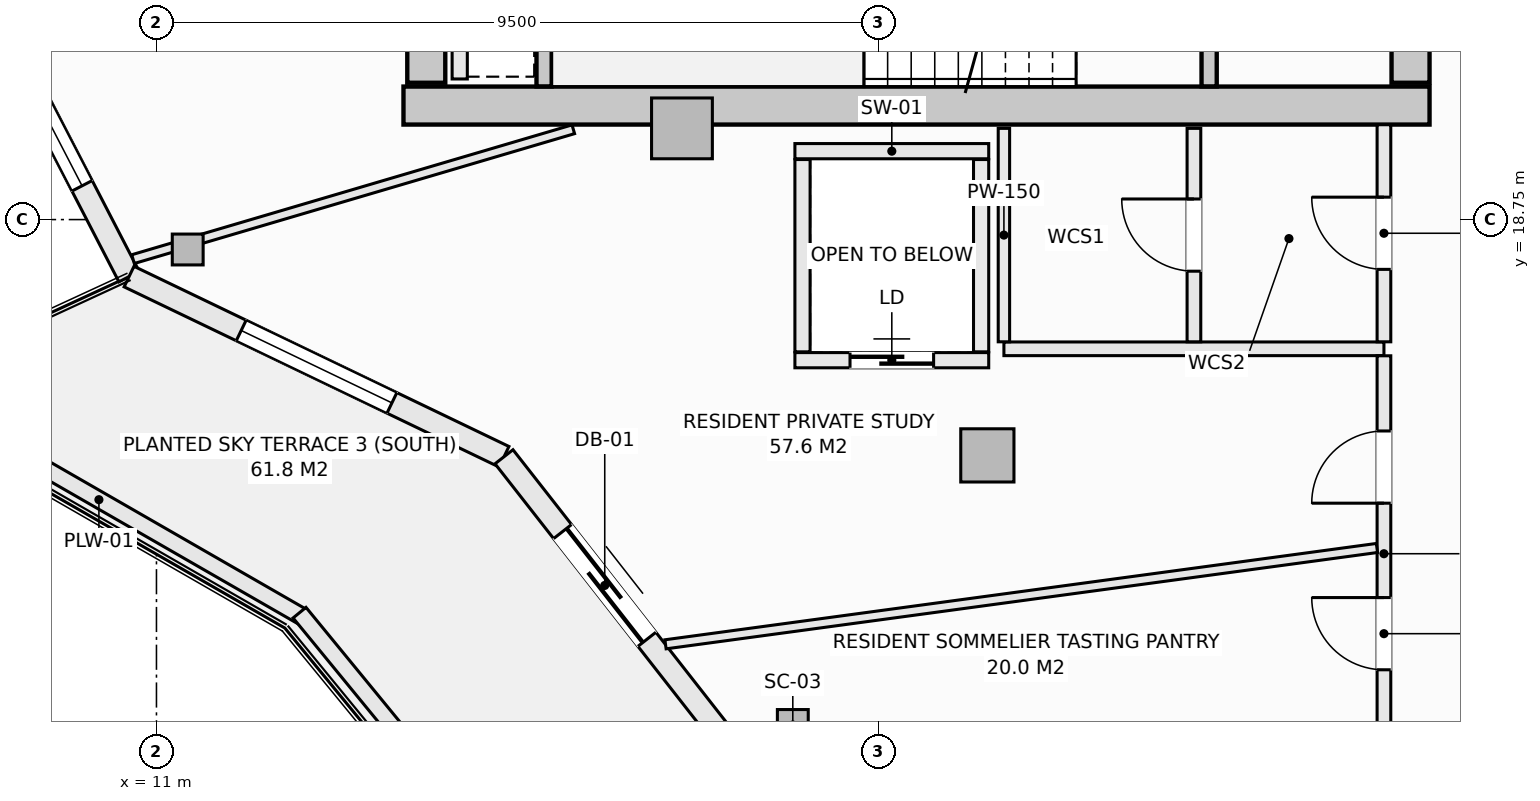
"""IFC4 building model, lengths in metres.
Left out: names, types, materials, properties, quantities, classifications, styles, units other than length and angle.
Written with IfcOpenShell. Run it as: python <this file> out.ifc"""

import sys

from ifc_helpers import new_model, si_unit, direction, frame, frame_2d, origin, origin_2d, place, context, subcontext, project, spatial, rectangle, hollow_rectangle, extrude, element, fill, save


model = new_model("IFC4")
c1 = context("Model", 3, precision=1e-05, world=origin(), true_north=direction((0.0, 1.0)))
c2 = subcontext(c1, "Body", "Model", "MODEL_VIEW")
j1 = project(units=[si_unit("LENGTHUNIT", "METRE"), si_unit("PLANEANGLEUNIT", "RADIAN")], contexts=[c1])
p1 = place(None, origin())
s1 = spatial("IfcSite", under=j1, at=p1, CompositionType="ELEMENT")
p2 = place(p1, origin())
s2 = spatial("IfcBuilding", under=s1, at=p2, CompositionType="ELEMENT")
p3 = place(p2, frame((0.0, 0.0, 245.9)))
s3 = spatial("IfcBuildingStorey", under=s2, at=p3, CompositionType="ELEMENT", Elevation=245.9)
p4 = place(p3, frame((14.25, 20.25, -0.27), z_axis=(0.0, 0.0, 1.0), x_axis=(1.0, 0.0, 0.0)))
e1 = element("IfcWall", 1, at=p4, inside=s3, PredefinedType="SHEAR", context=c2, shape_type="SweptSolid", body=[
    extrude(rectangle(XDim=13.5, YDim=0.5, at=frame_2d((6.75, 0.0))), origin(), (0.0, 0.0, 1.0), 3.3),
])
p5 = place(p3, frame((14.55, 20.55, -0.27), z_axis=(0.0, 0.0, 1.0), x_axis=(0.0, 1.0, 0.0)))
e2 = element("IfcWall", 2, at=p5, inside=s3, PredefinedType="SHEAR", context=c2, shape_type="SweptSolid", body=[
    extrude(rectangle(XDim=12.9, YDim=0.5, at=frame_2d((6.45, 0.0))), origin(), (0.0, 0.0, 1.0), 3.3),
])
p6 = place(p3, frame((27.5, 20.55, -0.27), z_axis=(0.0, 0.0, 1.0), x_axis=(0.0, 1.0, 0.0)))
e3 = element("IfcWall", 3, at=p6, inside=s3, PredefinedType="SHEAR", context=c2, shape_type="SweptSolid", body=[
    extrude(rectangle(XDim=1.5, YDim=0.5, at=frame_2d((0.75, 0.0))), origin(), (0.0, 0.0, 1.0), 3.3),
])
for number, where, z_axis, x_axis in (
    (4, (11.411, 18.356, -0.27), (0.0, 0.0, 1.0), (1.0, 0.0, 0.0)),
    (5, (19.372, 12.101, -0.27), (0.0, 0.0, 1.0), (1.0, 0.0, 0.0)),
):
    element("IfcColumn", number, at=place(p3, frame(where, z_axis=z_axis, x_axis=x_axis)), inside=s3, PredefinedType="COLUMN", context=c2, shape_type="SweptSolid", body=[
        extrude(hollow_rectangle(XDim=0.406, YDim=0.406, WallThickness=0.016, at=origin_2d()), origin(), (0.0, 0.0, 1.0), 3.3),
    ])
p7 = place(p3, frame((21.932, 15.648, -0.27), z_axis=(0.0, 0.0, 1.0), x_axis=(1.0, 0.0, 0.0)))
e6 = element("IfcColumn", 6, at=p7, inside=s3, PredefinedType="COLUMN", context=c2, shape_type="SweptSolid", body=[
    extrude(rectangle(XDim=0.7, YDim=0.7, at=origin_2d()), origin(), (0.0, 0.0, 1.0), 3.3),
])
p8 = place(p3, frame((17.914, 19.95, -0.27), z_axis=(0.0, 0.0, 1.0), x_axis=(1.0, 0.0, 0.0)))
e7 = element("IfcColumn", 7, at=p8, inside=s3, PredefinedType="PILASTER", context=c2, shape_type="SweptSolid", body=[
    extrude(rectangle(XDim=0.8, YDim=0.8, at=origin_2d()), origin(), (0.0, 0.0, 1.0), 3.3),
])
p9 = place(p3, frame((8.392, 22.341, 0.0), z_axis=(0.0, 0.0, 1.0), x_axis=(0.459793771602, -0.888025724625, 0.0)))
e8 = element("IfcWall", 8, at=p9, inside=s3, PredefinedType="SOLIDWALL", context=c2, shape_type="SweptSolid", body=[
    extrude(rectangle(XDim=4.889, YDim=0.3, at=frame_2d((2.444, 0.0))), origin(), (0.0, 0.0, 1.0), 2.605),
])
p10 = place(p9, frame((1.344, 0.0, 0.72)))
e9 = element("IfcOpeningElement", 9, at=p10, cuts=e8, PredefinedType="OPENING", context=c2, shape_type="SweptSolid", body=[
    extrude(rectangle(XDim=2.2, YDim=1.65, at=frame_2d((1.1, 0.825))), frame((0.0, 0.16, 0.0), z_axis=(0.0, -1.0, 0.0), x_axis=(1.0, 0.0, 0.0)), (0.0, 0.0, 1.0), 0.32),
])
p11 = place(p3, frame((10.639, 18.0, 0.0), z_axis=(0.0, 0.0, 1.0), x_axis=(0.901355238351, -0.433080517106, 0.0)))
e10 = element("IfcWall", 10, at=p11, inside=s3, PredefinedType="SOLIDWALL", context=c2, shape_type="SweptSolid", body=[
    extrude(rectangle(XDim=5.473, YDim=0.3, at=frame_2d((2.737, 0.0))), origin(), (0.0, 0.0, 1.0), 2.605),
])
p12 = place(p11, frame((1.637, 0.0, 0.72)))
e11 = element("IfcOpeningElement", 11, at=p12, cuts=e10, PredefinedType="OPENING", context=c2, shape_type="SweptSolid", body=[
    extrude(rectangle(XDim=2.2, YDim=1.65, at=frame_2d((1.1, 0.825))), frame((0.0, 0.16, 0.0), z_axis=(0.0, -1.0, 0.0), x_axis=(1.0, 0.0, 0.0)), (0.0, 0.0, 1.0), 0.32),
])
p13 = place(p3, frame((15.573, 15.63, 0.0), z_axis=(0.0, 0.0, 1.0), x_axis=(0.61644588519, -0.787397276241, 0.0)))
e12 = element("IfcWall", 12, at=p13, inside=s3, PredefinedType="SOLIDWALL", context=c2, shape_type="SweptSolid", body=[
    extrude(rectangle(XDim=5.357, YDim=0.3, at=frame_2d((2.678, 0.0))), origin(), (0.0, 0.0, 1.0), 2.605),
])
p14 = place(p13, frame((1.25, 0.0, 0.0)))
e13 = element("IfcOpeningElement", 13, at=p14, cuts=e12, PredefinedType="OPENING", context=c2, shape_type="SweptSolid", body=[
    extrude(rectangle(XDim=1.8, YDim=2.25, at=frame_2d((0.9, 1.125))), frame((0.0, 0.16, 0.0), z_axis=(0.0, -1.0, 0.0), x_axis=(1.0, 0.0, 0.0)), (0.0, 0.0, 1.0), 0.32),
])
p15 = place(p3, frame((7.557, 16.609, 0.0), z_axis=(0.0, 0.0, 1.0), x_axis=(0.866901621005, -0.49847926687, 0.0)))
e14 = element("IfcWall", 14, at=p15, inside=s3, PredefinedType="PARAPET", context=c2, shape_type="SweptSolid", body=[
    extrude(rectangle(XDim=6.197, YDim=0.22, at=frame_2d((3.098, 0.0))), origin(), (0.0, 0.0, 1.0), 0.52),
])
p16 = place(p3, frame((12.882, 13.579, 0.0), z_axis=(0.0, 0.0, 1.0), x_axis=(0.63407318032, -0.77327304492, 0.0)))
e15 = element("IfcWall", 15, at=p16, inside=s3, PredefinedType="PARAPET", context=c2, shape_type="SweptSolid", body=[
    extrude(rectangle(XDim=6.379, YDim=0.22, at=frame_2d((3.189, 0.0))), origin(), (0.0, 0.0, 1.0), 0.52),
])
p17 = place(p3, frame((24.85, 20.502, -0.27), z_axis=(0.0, 0.0, 1.0), x_axis=(0.0, 1.0, 0.0)))
e16 = element("IfcWall", 16, at=p17, inside=s3, PredefinedType="SHEAR", context=c2, shape_type="SweptSolid", body=[
    extrude(rectangle(XDim=3.038, YDim=0.2, at=frame_2d((1.519, 0.0))), origin(), (0.0, 0.0, 1.0), 3.3),
])
p18 = place(p17, frame((0.969, 0.0, 0.27)))
e17 = element("IfcOpeningElement", 17, at=p18, cuts=e16, PredefinedType="OPENING", context=c2, shape_type="SweptSolid", body=[
    extrude(rectangle(XDim=1.1, YDim=2.15, at=frame_2d((0.55, 1.075))), frame((0.0, 0.11, 0.0), z_axis=(0.0, -1.0, 0.0), x_axis=(1.0, 0.0, 0.0)), (0.0, 0.0, 1.0), 0.22),
])
p19 = place(p3, frame((16.1, 20.502, -0.27), z_axis=(0.0, 0.0, 1.0), x_axis=(0.0, 1.0, 0.0)))
e18 = element("IfcWall", 18, at=p19, inside=s3, PredefinedType="SHEAR", context=c2, shape_type="SweptSolid", body=[
    extrude(rectangle(XDim=3.036, YDim=0.2, at=frame_2d((1.518, 0.0))), origin(), (0.0, 0.0, 1.0), 3.3),
])
p20 = place(p3, frame((19.4, 19.65, 0.0), z_axis=(0.0, 0.0, 1.0), x_axis=(1.0, 0.0, 0.0)))
e19 = element("IfcWall", 19, at=p20, inside=s3, PredefinedType="SOLIDWALL", context=c2, shape_type="SweptSolid", body=[
    extrude(rectangle(XDim=2.55, YDim=0.2, at=frame_2d((1.275, 0.0))), origin(), (0.0, 0.0, 1.0), 3.03),
])
p21 = place(p3, frame((19.4, 16.9, 0.0), z_axis=(0.0, 0.0, 1.0), x_axis=(1.0, 0.0, 0.0)))
e20 = element("IfcWall", 20, at=p21, inside=s3, PredefinedType="SOLIDWALL", context=c2, shape_type="SweptSolid", body=[
    extrude(rectangle(XDim=2.55, YDim=0.2, at=frame_2d((1.275, 0.0))), origin(), (0.0, 0.0, 1.0), 3.03),
])
p22 = place(p21, frame((0.725, 0.0, 0.0)))
e21 = element("IfcOpeningElement", 21, at=p22, cuts=e20, PredefinedType="OPENING", context=c2, shape_type="SweptSolid", body=[
    extrude(rectangle(XDim=1.1, YDim=2.2, at=frame_2d((0.55, 1.1))), frame((0.0, 0.11, 0.0), z_axis=(0.0, -1.0, 0.0), x_axis=(1.0, 0.0, 0.0)), (0.0, 0.0, 1.0), 0.22),
])
for number, where, z_axis, x_axis in (
    (22, (19.5, 17.01, 0.0), (0.0, 0.0, 1.0), (0.0, 1.0, 0.0)),
    (23, (21.85, 17.01, 0.0), (0.0, 0.0, 1.0), (0.0, 1.0, 0.0)),
):
    element("IfcWall", number, at=place(p3, frame(where, z_axis=z_axis, x_axis=x_axis)), inside=s3, PredefinedType="SOLIDWALL", context=c2, shape_type="SweptSolid", body=[
        extrude(rectangle(XDim=2.53, YDim=0.2, at=frame_2d((1.265, 0.0))), origin(), (0.0, 0.0, 1.0), 3.03),
    ])
p23 = place(p3, frame((14.99, 20.6, 0.0), z_axis=(0.0, 0.0, 1.0), x_axis=(0.0, 1.0, 0.0)))
e24 = element("IfcWall", 24, at=p23, inside=s3, PredefinedType="SOLIDWALL", context=c2, shape_type="SweptSolid", body=[
    extrude(rectangle(XDim=2.85, YDim=0.2, at=frame_2d((1.425, 0.0))), origin(), (0.0, 0.0, 1.0), 3.03),
])
p24 = place(p3, frame((22.15, 17.05, 0.0), z_axis=(0.0, 0.0, 1.0), x_axis=(1.0, 0.0, 0.0)))
e25 = element("IfcWall", 25, at=p24, inside=s3, PredefinedType="SOLIDWALL", context=c2, shape_type="SweptSolid", body=[
    extrude(rectangle(XDim=5.0, YDim=0.18, at=frame_2d((2.5, 0.0))), origin(), (0.0, 0.0, 1.0), 3.03),
])
p25 = place(p3, frame((22.15, 17.142, 0.0), z_axis=(0.0, 0.0, 1.0), x_axis=(0.0, 1.0, 0.0)))
e26 = element("IfcWall", 26, at=p25, inside=s3, PredefinedType="PARTITIONING", context=c2, shape_type="SweptSolid", body=[
    extrude(rectangle(XDim=2.808, YDim=0.15, at=frame_2d((1.404, 0.0))), origin(), (0.0, 0.0, 1.0), 3.03),
])
p26 = place(p3, frame((24.65, 17.142, 0.0), z_axis=(0.0, 0.0, 1.0), x_axis=(0.0, 1.0, 0.0)))
e27 = element("IfcWall", 27, at=p26, inside=s3, PredefinedType="SOLIDWALL", context=c2, shape_type="SweptSolid", body=[
    extrude(rectangle(XDim=2.808, YDim=0.18, at=frame_2d((1.404, 0.0))), origin(), (0.0, 0.0, 1.0), 3.03),
])
p27 = place(p26, frame((0.929, 0.0, 0.0)))
e28 = element("IfcOpeningElement", 28, at=p27, cuts=e27, PredefinedType="OPENING", context=c2, shape_type="SweptSolid", body=[
    extrude(rectangle(XDim=0.95, YDim=2.1, at=frame_2d((0.475, 1.05))), frame((0.0, 0.1, 0.0), z_axis=(0.0, -1.0, 0.0), x_axis=(1.0, 0.0, 0.0)), (0.0, 0.0, 1.0), 0.2),
])
p28 = place(p3, frame((27.15, 11.75, 0.0), z_axis=(0.0, 0.0, 1.0), x_axis=(0.0, 1.0, 0.0)))
e29 = element("IfcWall", 29, at=p28, inside=s3, PredefinedType="SOLIDWALL", context=c2, shape_type="SweptSolid", body=[
    extrude(rectangle(XDim=5.208, YDim=0.18, at=frame_2d((2.604, 0.0))), origin(), (0.0, 0.0, 1.0), 3.03),
])
p29 = place(p28, frame((3.269, 0.0, 0.0)))
e30 = element("IfcOpeningElement", 30, at=p29, cuts=e29, PredefinedType="OPENING", context=c2, shape_type="SweptSolid", body=[
    extrude(rectangle(XDim=0.95, YDim=2.1, at=frame_2d((0.475, 1.05))), frame((0.0, 0.1, 0.0), z_axis=(0.0, -1.0, 0.0), x_axis=(1.0, 0.0, 0.0)), (0.0, 0.0, 1.0), 0.2),
])
p30 = place(p28, frame((1.077, 0.0, 0.0)))
e31 = element("IfcOpeningElement", 31, at=p30, cuts=e29, PredefinedType="OPENING", context=c2, shape_type="SweptSolid", body=[
    extrude(rectangle(XDim=0.95, YDim=2.1, at=frame_2d((0.475, 1.05))), frame((0.0, 0.1, 0.0), z_axis=(0.0, -1.0, 0.0), x_axis=(1.0, 0.0, 0.0)), (0.0, 0.0, 1.0), 0.2),
])
p31 = place(p3, frame((27.15, 17.142, 0.0), z_axis=(0.0, 0.0, 1.0), x_axis=(0.0, 1.0, 0.0)))
e32 = element("IfcWall", 32, at=p31, inside=s3, PredefinedType="SOLIDWALL", context=c2, shape_type="SweptSolid", body=[
    extrude(rectangle(XDim=2.856, YDim=0.18, at=frame_2d((1.428, 0.0))), origin(), (0.0, 0.0, 1.0), 3.03),
])
p32 = place(p31, frame((0.953, 0.0, 0.0)))
e33 = element("IfcOpeningElement", 33, at=p32, cuts=e32, PredefinedType="OPENING", context=c2, shape_type="SweptSolid", body=[
    extrude(rectangle(XDim=0.95, YDim=2.1, at=frame_2d((0.475, 1.05))), frame((0.0, 0.1, 0.0), z_axis=(0.0, -1.0, 0.0), x_axis=(1.0, 0.0, 0.0)), (0.0, 0.0, 1.0), 0.2),
])
p33 = place(p3, frame((10.692, 18.23, 0.0), z_axis=(0.0, 0.0, 1.0), x_axis=(0.959163130609, 0.282853475992, 0.0)))
e34 = element("IfcWall", 34, at=p33, inside=s3, PredefinedType="PARTITIONING", context=c2, shape_type="SweptSolid", body=[
    extrude(rectangle(XDim=6.039, YDim=0.12, at=frame_2d((3.02, 0.0))), origin(), (0.0, 0.0, 1.0), 2.77),
])
p34 = place(p3, frame((17.698, 13.162, 0.0), z_axis=(0.0, 0.0, 1.0), x_axis=(0.990958840374, 0.134166227808, 0.0)))
e35 = element("IfcWall", 35, at=p34, inside=s3, PredefinedType="PARTITIONING", context=c2, shape_type="SweptSolid", body=[
    extrude(rectangle(XDim=9.446, YDim=0.12, at=frame_2d((4.723, 0.0))), origin(), (0.0, 0.0, 1.0), 3.03),
])
p35 = place(p10, origin())
e36 = element("IfcWindow", 36, at=p35, inside=s3, PartitioningType="SINGLE_PANEL", PredefinedType="WINDOW", context=c2, shape_type="SweptSolid", body=[
    extrude(rectangle(XDim=2.2, YDim=1.65, at=frame_2d((1.1, 0.825))), frame((0.0, 0.03, 0.0), z_axis=(0.0, -1.0, 0.0), x_axis=(1.0, 0.0, 0.0)), (0.0, 0.0, 1.0), 0.06),
])
fill(e9, e36)
p36 = place(p12, origin())
e37 = element("IfcWindow", 37, at=p36, inside=s3, PartitioningType="SINGLE_PANEL", PredefinedType="WINDOW", context=c2, shape_type="SweptSolid", body=[
    extrude(rectangle(XDim=2.2, YDim=1.65, at=frame_2d((1.1, 0.825))), frame((0.0, 0.03, 0.0), z_axis=(0.0, -1.0, 0.0), x_axis=(1.0, 0.0, 0.0)), (0.0, 0.0, 1.0), 0.06),
])
fill(e11, e37)
p37 = place(p14, frame((1.8, 0.0, 0.0), z_axis=(0.0, 0.0, 1.0), x_axis=(-1.0, 0.0, 0.0)))
e38 = element("IfcDoor", 38, at=p37, inside=s3, OperationType="SLIDING_TO_LEFT", PredefinedType="DOOR", context=c2, shape_type="SweptSolid", body=[
    extrude(rectangle(XDim=1.8, YDim=2.25, at=frame_2d((0.9, 1.125))), frame((0.0, 0.025, 0.0), z_axis=(0.0, -1.0, 0.0), x_axis=(1.0, 0.0, 0.0)), (0.0, 0.0, 1.0), 0.05),
])
fill(e13, e38)
p38 = place(p22, origin())
e39 = element("IfcDoor", 39, at=p38, inside=s3, OperationType="SLIDING_TO_LEFT", PredefinedType="DOOR", context=c2, shape_type="SweptSolid", body=[
    extrude(rectangle(XDim=1.1, YDim=2.2, at=frame_2d((0.55, 1.1))), frame((0.0, 0.025, 0.0), z_axis=(0.0, -1.0, 0.0), x_axis=(1.0, 0.0, 0.0)), (0.0, 0.0, 1.0), 0.05),
])
fill(e21, e39)
p39 = place(p32, origin())
e40 = element("IfcDoor", 40, at=p39, inside=s3, OperationType="SINGLE_SWING_RIGHT", PredefinedType="DOOR", context=c2, shape_type="SweptSolid", body=[
    extrude(rectangle(XDim=0.95, YDim=2.1, at=frame_2d((0.475, 1.05))), frame((0.0, 0.025, 0.0), z_axis=(0.0, -1.0, 0.0), x_axis=(1.0, 0.0, 0.0)), (0.0, 0.0, 1.0), 0.05),
])
fill(e33, e40)
p40 = place(p29, origin())
e41 = element("IfcDoor", 41, at=p40, inside=s3, OperationType="SINGLE_SWING_LEFT", PredefinedType="DOOR", context=c2, shape_type="SweptSolid", body=[
    extrude(rectangle(XDim=0.95, YDim=2.1, at=frame_2d((0.475, 1.05))), frame((0.0, 0.025, 0.0), z_axis=(0.0, -1.0, 0.0), x_axis=(1.0, 0.0, 0.0)), (0.0, 0.0, 1.0), 0.05),
])
fill(e30, e41)
p41 = place(p30, origin())
e42 = element("IfcDoor", 42, at=p41, inside=s3, OperationType="SINGLE_SWING_RIGHT", PredefinedType="DOOR", context=c2, shape_type="SweptSolid", body=[
    extrude(rectangle(XDim=0.95, YDim=2.1, at=frame_2d((0.475, 1.05))), frame((0.0, 0.025, 0.0), z_axis=(0.0, -1.0, 0.0), x_axis=(1.0, 0.0, 0.0)), (0.0, 0.0, 1.0), 0.05),
])
fill(e31, e42)
p42 = place(p27, origin())
e43 = element("IfcDoor", 43, at=p42, inside=s3, OperationType="SINGLE_SWING_RIGHT", PredefinedType="DOOR", context=c2, shape_type="SweptSolid", body=[
    extrude(rectangle(XDim=0.95, YDim=2.1, at=frame_2d((0.475, 1.05))), frame((0.0, 0.025, 0.0), z_axis=(0.0, -1.0, 0.0), x_axis=(1.0, 0.0, 0.0)), (0.0, 0.0, 1.0), 0.05),
])
fill(e28, e43)
save(model, sys.argv[1])
